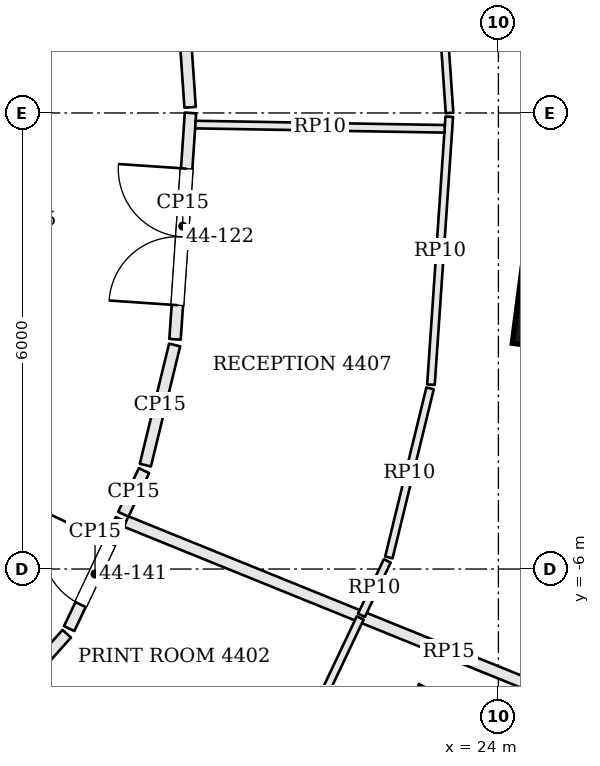
"""IFC4 building model, lengths in metres.
Left out: names, types, materials, properties, quantities, classifications, styles, units other than length and angle.
Written with IfcOpenShell. Run it as: python <this file> out.ifc"""

import sys

from ifc_helpers import new_model, si_unit, direction, frame, frame_2d, origin, origin_2d, place, context, subcontext, project, spatial, rectangle, extrude, element, fill, save


model = new_model("IFC4")
c1 = context("Model", 3, precision=1e-05, world=origin(), true_north=direction((0.0, 1.0)))
c2 = subcontext(c1, "Body", "Model", "MODEL_VIEW")
j1 = project(units=[si_unit("LENGTHUNIT", "METRE"), si_unit("PLANEANGLEUNIT", "RADIAN")], contexts=[c1])
p1 = place(None, origin())
s1 = spatial("IfcSite", under=j1, at=p1, CompositionType="ELEMENT")
p2 = place(p1, origin())
s2 = spatial("IfcBuilding", under=s1, at=p2, CompositionType="ELEMENT")
p3 = place(p2, frame((0.0, 0.0, 181.8)))
s3 = spatial("IfcBuildingStorey", under=s2, at=p3, CompositionType="ELEMENT", Elevation=181.8)
for number, where, z_axis, x_axis in (
    (1, (23.185, -8.21, 0.0), (0.0, 0.0, 1.0), (0.451, 0.893, 0.0)),
    (2, (24.743, -2.599, 0.0), (0.0, 0.0, 1.0), (0.128, 0.992, 0.0)),
):
    element("IfcColumn", number, at=place(p3, frame(where, z_axis=z_axis, x_axis=x_axis)), inside=s3, PredefinedType="COLUMN", context=c2, shape_type="SweptSolid", body=[
        extrude(rectangle(XDim=1.0, YDim=1.0, at=origin_2d()), origin(), (0.0, 0.0, 1.0), 3.9),
    ])
p4 = place(p3, frame((16.193, -9.229, 0.0), z_axis=(0.0, 0.0, 1.0), x_axis=(0.666882089048, 0.745163256815, 0.0)))
e3 = element("IfcWall", 3, at=p4, inside=s3, PredefinedType="PARTITIONING", context=c2, shape_type="SweptSolid", body=[
    extrude(rectangle(XDim=3.19, YDim=0.15, at=frame_2d((1.595, 0.0))), origin(), (0.0, 0.0, 1.0), 3.084),
])
p5 = place(p3, frame((18.353, -6.784, 0.0), z_axis=(0.0, 0.0, 1.0), x_axis=(0.428125964575, 0.90371907054, 0.0)))
e4 = element("IfcWall", 4, at=p5, inside=s3, PredefinedType="PARTITIONING", context=c2, shape_type="SweptSolid", body=[
    extrude(rectangle(XDim=1.589, YDim=0.15, at=frame_2d((0.795, 0.0))), origin(), (0.0, 0.0, 1.0), 3.084),
])
p6 = place(p5, frame((0.35, 0.0, 0.0)))
e5 = element("IfcOpeningElement", 5, at=p6, cuts=e4, PredefinedType="OPENING", context=c2, shape_type="SweptSolid", body=[
    extrude(rectangle(XDim=0.9, YDim=2.1, at=frame_2d((0.45, 1.05))), frame((0.0, 0.085, 0.0), z_axis=(0.0, -1.0, 0.0), x_axis=(1.0, 0.0, 0.0)), (0.0, 0.0, 1.0), 0.17),
])
p7 = place(p3, frame((27.593, -8.816, 0.0), z_axis=(0.0, 0.0, 1.0), x_axis=(-0.9267854071, 0.375591279433, 0.0)))
e6 = element("IfcWall", 6, at=p7, inside=s3, PredefinedType="PARTITIONING", context=c2, shape_type="SweptSolid", body=[
    extrude(rectangle(XDim=9.161, YDim=0.15, at=frame_2d((4.58, 0.0))), origin(), (0.0, 0.0, 1.0), 3.234),
])
p8 = place(p3, frame((19.065, -5.28, 0.0), z_axis=(0.0, 0.0, 1.0), x_axis=(0.428202003813, 0.903683043954, 0.0)))
e7 = element("IfcWall", 7, at=p8, inside=s3, PredefinedType="PARTITIONING", context=c2, shape_type="SweptSolid", body=[
    extrude(rectangle(XDim=0.635, YDim=0.15, at=frame_2d((0.318, 0.0))), origin(), (0.0, 0.0, 1.0), 3.084),
])
p9 = place(p3, frame((19.355, -4.633, 0.0), z_axis=(0.0, 0.0, 1.0), x_axis=(0.236703930685, 0.971581828359, 0.0)))
e8 = element("IfcWall", 8, at=p9, inside=s3, PredefinedType="PARTITIONING", context=c2, shape_type="SweptSolid", body=[
    extrude(rectangle(XDim=1.626, YDim=0.15, at=frame_2d((0.813, 0.0))), origin(), (0.0, 0.0, 1.0), 3.084),
])
p10 = place(p3, frame((19.745, -2.978, 0.0), z_axis=(0.0, 0.0, 1.0), x_axis=(0.068142324, 0.997675610447, 0.0)))
e9 = element("IfcWall", 9, at=p10, inside=s3, PredefinedType="PARTITIONING", context=c2, shape_type="SweptSolid", body=[
    extrude(rectangle(XDim=2.984, YDim=0.15, at=frame_2d((1.492, 0.0))), origin(), (0.0, 0.0, 1.0), 3.084),
])
p11 = place(p10, frame((0.45, 0.0, 0.0)))
e10 = element("IfcOpeningElement", 10, at=p11, cuts=e9, PredefinedType="OPENING", context=c2, shape_type="SweptSolid", body=[
    extrude(rectangle(XDim=1.8, YDim=2.1, at=frame_2d((0.9, 1.05))), frame((0.0, 0.085, 0.0), z_axis=(0.0, -1.0, 0.0), x_axis=(1.0, 0.0, 0.0)), (0.0, 0.0, 1.0), 0.17),
])
p12 = place(p3, frame((19.944, 0.075, 0.0), z_axis=(0.0, 0.0, 1.0), x_axis=(-0.068136763128, 0.997675990245, 0.0)))
e11 = element("IfcWall", 11, at=p12, inside=s3, PredefinedType="PARTITIONING", context=c2, shape_type="SweptSolid", body=[
    extrude(rectangle(XDim=2.985, YDim=0.15, at=frame_2d((1.492, 0.0))), origin(), (0.0, 0.0, 1.0), 3.084),
])
p13 = place(p12, frame((0.917, 0.0, 0.0)))
e12 = element("IfcOpeningElement", 12, at=p13, cuts=e11, PredefinedType="OPENING", context=c2, shape_type="SweptSolid", body=[
    extrude(rectangle(XDim=1.0, YDim=2.4, at=frame_2d((0.5, 1.2))), frame((0.0, 0.085, 0.0), z_axis=(0.0, -1.0, 0.0), x_axis=(1.0, 0.0, 0.0)), (0.0, 0.0, 1.0), 0.17),
])
p14 = place(p3, frame((22.181, -6.645, 0.0), z_axis=(0.0, 0.0, 1.0), x_axis=(-0.428144841987, -0.903710127353, 0.0)))
e13 = element("IfcWall", 13, at=p14, inside=s3, PredefinedType="PARTITIONING", context=c2, shape_type="SweptSolid", body=[
    extrude(rectangle(XDim=2.332, YDim=0.1, at=frame_2d((1.166, 0.0))), origin(), (0.0, 0.0, 1.0), 3.084),
])
p15 = place(p3, frame((17.853, -7.487, 0.0), z_axis=(0.0, 0.0, 1.0), x_axis=(0.802681916891, -0.596407361034, 0.0)))
e14 = element("IfcWall", 14, at=p15, inside=s3, PredefinedType="PARTITIONING", context=c2, shape_type="SweptSolid", body=[
    extrude(rectangle(XDim=3.289, YDim=0.1, at=frame_2d((1.645, 0.0))), origin(), (0.0, 0.0, 1.0), 3.084),
])
p16 = place(p3, frame((23.116, 3.525, 0.0), z_axis=(0.0, 0.0, 1.0), x_axis=(0.068138009452, -0.997675905125, 0.0)))
e15 = element("IfcWall", 15, at=p16, inside=s3, PredefinedType="PARTITIONING", context=c2, shape_type="SweptSolid", body=[
    extrude(rectangle(XDim=3.533, YDim=0.1, at=frame_2d((1.767, 0.0))), origin(), (0.0, 0.0, 1.0), 3.084),
])
p17 = place(p16, frame((1.25, 0.0, 0.0)))
e16 = element("IfcOpeningElement", 16, at=p17, cuts=e15, PredefinedType="OPENING", context=c2, shape_type="SweptSolid", body=[
    extrude(rectangle(XDim=1.0, YDim=2.4, at=frame_2d((0.5, 1.2))), frame((0.0, 0.06, 0.0), z_axis=(0.0, -1.0, 0.0), x_axis=(1.0, 0.0, 0.0)), (0.0, 0.0, 1.0), 0.12),
])
p18 = place(p3, frame((23.354, -0.05, 0.0), z_axis=(0.0, 0.0, 1.0), x_axis=(-0.06820679361, -0.99767120501, 0.0)))
e17 = element("IfcWall", 17, at=p18, inside=s3, PredefinedType="PARTITIONING", context=c2, shape_type="SweptSolid", body=[
    extrude(rectangle(XDim=3.533, YDim=0.1, at=frame_2d((1.767, 0.0))), origin(), (0.0, 0.0, 1.0), 3.084),
])
p19 = place(p3, frame((23.101, -3.623, 0.0), z_axis=(0.0, 0.0, 1.0), x_axis=(-0.236811358433, -0.971555649727, 0.0)))
e18 = element("IfcWall", 18, at=p19, inside=s3, PredefinedType="PARTITIONING", context=c2, shape_type="SweptSolid", body=[
    extrude(rectangle(XDim=2.29, YDim=0.1, at=frame_2d((1.145, 0.0))), origin(), (0.0, 0.0, 1.0), 3.084),
])
p20 = place(p3, frame((22.537, -5.893, 0.0), z_axis=(0.0, 0.0, 1.0), x_axis=(-0.427993557618, -0.903781784856, 0.0)))
e19 = element("IfcWall", 19, at=p20, inside=s3, PredefinedType="PARTITIONING", context=c2, shape_type="SweptSolid", body=[
    extrude(rectangle(XDim=0.792, YDim=0.1, at=frame_2d((0.396, 0.0))), origin(), (0.0, 0.0, 1.0), 3.084),
])
p21 = place(p3, frame((20.013, -0.153, 0.0), z_axis=(0.0, 0.0, 1.0), x_axis=(0.999854678593, -0.017047630214, 0.0)))
e20 = element("IfcWall", 20, at=p21, inside=s3, PredefinedType="PARTITIONING", context=c2, shape_type="SweptSolid", body=[
    extrude(rectangle(XDim=3.28, YDim=0.1, at=frame_2d((1.64, 0.0))), origin(), (0.0, 0.0, 1.0), 3.084),
])
p22 = place(p11, origin())
e21 = element("IfcDoor", 21, at=p22, inside=s3, OperationType="DOUBLE_DOOR_SINGLE_SWING", PredefinedType="DOOR", context=c2, shape_type="SweptSolid", body=[
    extrude(rectangle(XDim=1.8, YDim=2.1, at=frame_2d((0.9, 1.05))), frame((0.0, 0.025, 0.0), z_axis=(0.0, -1.0, 0.0), x_axis=(1.0, 0.0, 0.0)), (0.0, 0.0, 1.0), 0.05),
])
fill(e10, e21)
p23 = place(p6, origin())
e22 = element("IfcDoor", 22, at=p23, inside=s3, OperationType="SINGLE_SWING_RIGHT", PredefinedType="DOOR", context=c2, shape_type="SweptSolid", body=[
    extrude(rectangle(XDim=0.9, YDim=2.1, at=frame_2d((0.45, 1.05))), frame((0.0, 0.025, 0.0), z_axis=(0.0, -1.0, 0.0), x_axis=(1.0, 0.0, 0.0)), (0.0, 0.0, 1.0), 0.05),
])
fill(e5, e22)
save(model, sys.argv[1])
